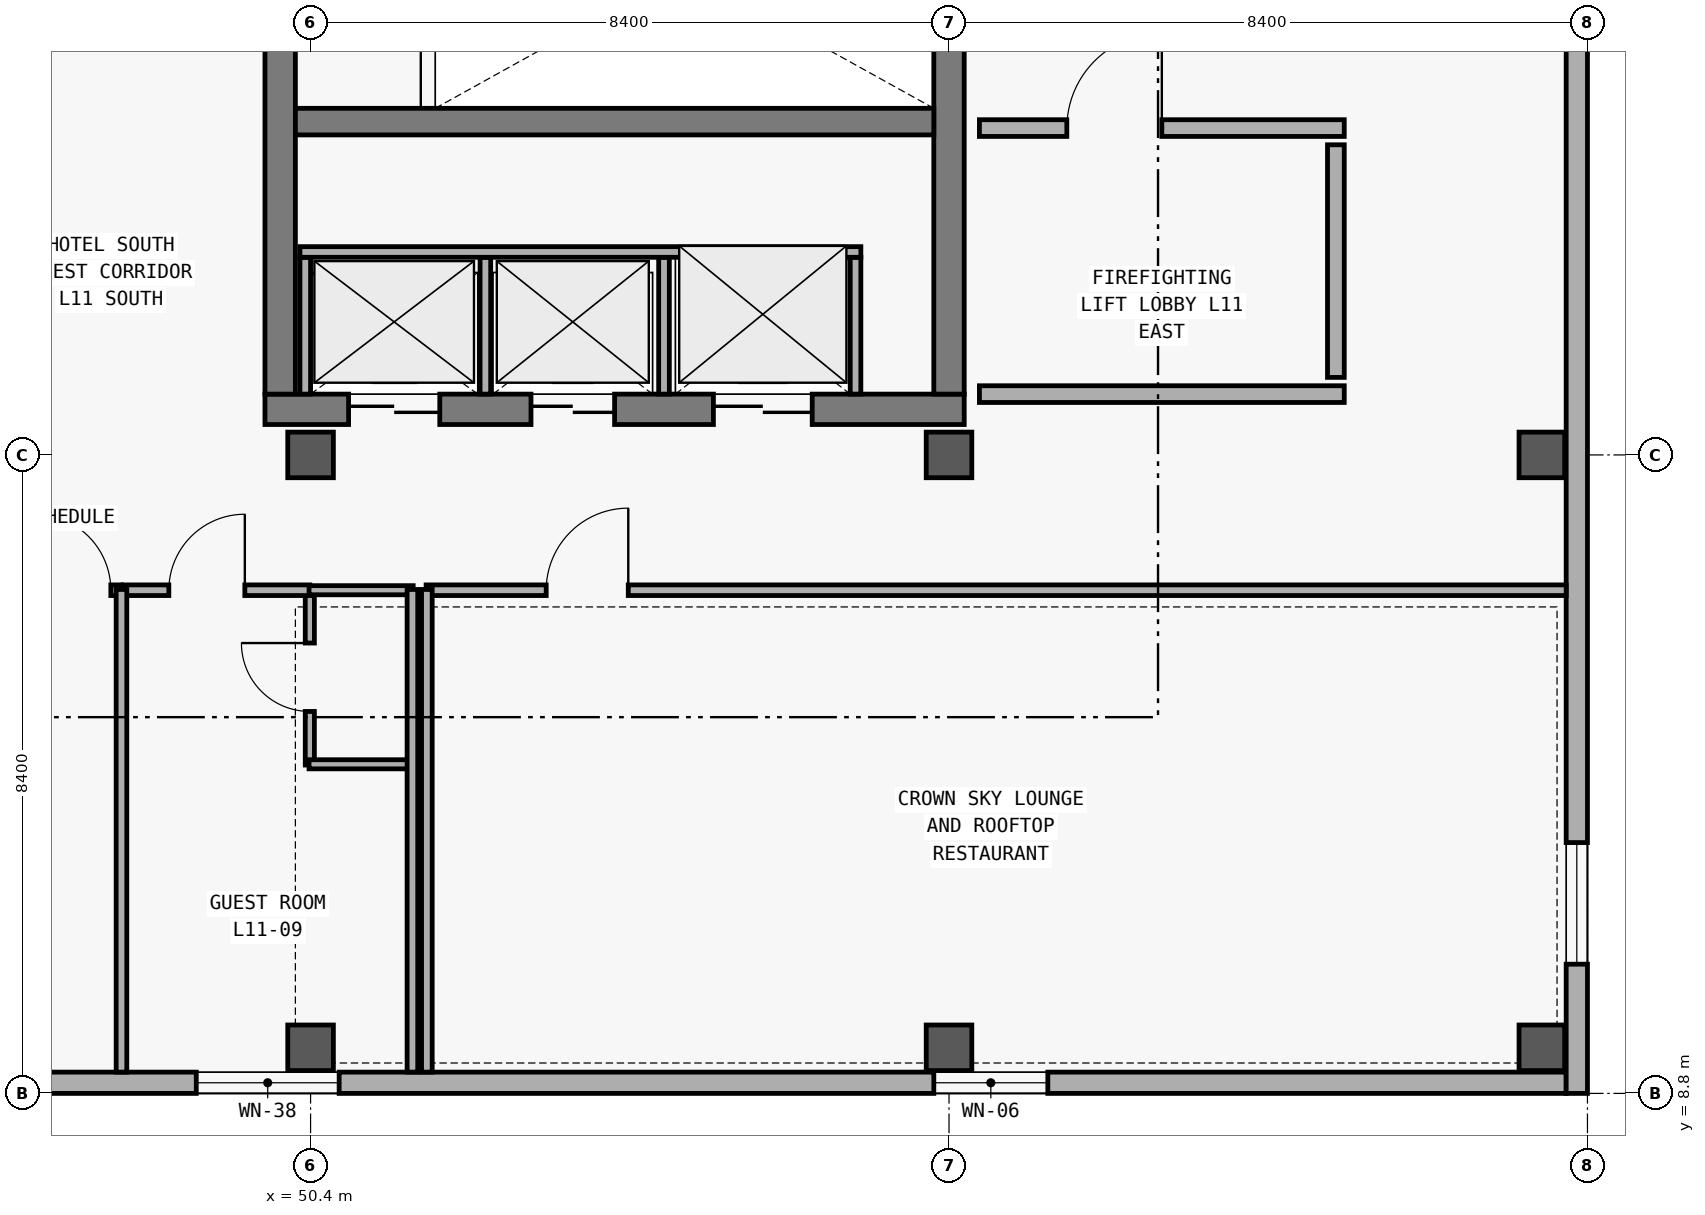
"""IFC4 building model, lengths in metres.
Left out: names, types, materials, properties, quantities, classifications, styles, units other than length and angle.
Written with IfcOpenShell. Run it as: python <this file> out.ifc"""

import sys

from ifc_helpers import new_model, si_unit, direction, frame, frame_2d, origin, origin_2d, place, context, subcontext, project, spatial, rectangle, extrude, element, fill, save


model = new_model("IFC4")
c1 = context("Model", 3, precision=1e-05, world=origin(), true_north=direction((0.0, 1.0)))
c2 = subcontext(c1, "Body", "Model", "MODEL_VIEW")
j1 = project(units=[si_unit("LENGTHUNIT", "METRE"), si_unit("PLANEANGLEUNIT", "RADIAN")], contexts=[c1])
p1 = place(None, origin())
s1 = spatial("IfcSite", under=j1, at=p1, CompositionType="ELEMENT")
p2 = place(p1, origin())
s2 = spatial("IfcBuilding", under=s1, at=p2, CompositionType="ELEMENT")
p3 = place(p2, frame((0.0, 0.0, 44.4)))
s3 = spatial("IfcBuildingStorey", under=s2, at=p3, CompositionType="ELEMENT", Elevation=44.4)
for number, where, z_axis, x_axis in (
    (1, (50.4, 9.4, 0.0), (0.0, 0.0, 1.0), (1.0, 0.0, 0.0)),
    (2, (50.4, 17.2, 0.0), (0.0, 0.0, 1.0), (1.0, 0.0, 0.0)),
    (3, (58.8, 9.4, 0.0), (0.0, 0.0, 1.0), (1.0, 0.0, 0.0)),
    (4, (58.8, 17.2, 0.0), (0.0, 0.0, 1.0), (1.0, 0.0, 0.0)),
    (5, (66.6, 9.4, 0.0), (0.0, 0.0, 1.0), (1.0, 0.0, 0.0)),
    (6, (66.6, 17.2, 0.0), (0.0, 0.0, 1.0), (1.0, 0.0, 0.0)),
):
    element("IfcColumn", number, at=place(p3, frame(where, z_axis=z_axis, x_axis=x_axis)), inside=s3, PredefinedType="COLUMN", context=c2, shape_type="SweptSolid", body=[
        extrude(rectangle(XDim=0.6, YDim=0.6, at=origin_2d()), origin(), (0.0, 0.0, 1.0), 4.2),
    ])
p4 = place(p3, frame((66.92, 8.94, 0.0), z_axis=(0.0, 0.0, 1.0), x_axis=(-1.0, 0.0, 0.0)))
e7 = element("IfcWall", 7, at=p4, inside=s3, PredefinedType="SOLIDWALL", context=c2, shape_type="SweptSolid", body=[
    extrude(rectangle(XDim=49.84, YDim=0.28, at=frame_2d((24.92, 0.0))), origin(), (0.0, 0.0, 1.0), 3.96),
])
p5 = place(p4, frame((6.82, 0.0, 0.85)))
e8 = element("IfcOpeningElement", 8, at=p5, cuts=e7, PredefinedType="OPENING", context=c2, shape_type="SweptSolid", body=[
    extrude(rectangle(XDim=1.5, YDim=1.75, at=frame_2d((0.75, 0.875))), frame((0.0, 0.15, 0.0), z_axis=(0.0, -1.0, 0.0), x_axis=(1.0, 0.0, 0.0)), (0.0, 0.0, 1.0), 0.3),
])
p6 = place(p4, frame((46.331, 0.0, 0.85)))
e9 = element("IfcOpeningElement", 9, at=p6, cuts=e7, PredefinedType="OPENING", context=c2, shape_type="SweptSolid", body=[
    extrude(rectangle(XDim=2.75, YDim=2.1, at=frame_2d((1.375, 1.05))), frame((0.0, 0.15, 0.0), z_axis=(0.0, -1.0, 0.0), x_axis=(1.0, 0.0, 0.0)), (0.0, 0.0, 1.0), 0.3),
])
p7 = place(p4, frame((43.288, 0.0, 0.85)))
e10 = element("IfcOpeningElement", 10, at=p7, cuts=e7, PredefinedType="OPENING", context=c2, shape_type="SweptSolid", body=[
    extrude(rectangle(XDim=1.18, YDim=1.5, at=frame_2d((0.59, 0.75))), frame((0.0, 0.15, 0.0), z_axis=(0.0, -1.0, 0.0), x_axis=(1.0, 0.0, 0.0)), (0.0, 0.0, 1.0), 0.3),
])
p8 = place(p4, frame((39.41, 0.0, 0.85)))
e11 = element("IfcOpeningElement", 11, at=p8, cuts=e7, PredefinedType="OPENING", context=c2, shape_type="SweptSolid", body=[
    extrude(rectangle(XDim=1.28, YDim=1.6, at=frame_2d((0.64, 0.8))), frame((0.0, 0.15, 0.0), z_axis=(0.0, -1.0, 0.0), x_axis=(1.0, 0.0, 0.0)), (0.0, 0.0, 1.0), 0.3),
])
p9 = place(p4, frame((35.533, 0.0, 0.85)))
e12 = element("IfcOpeningElement", 12, at=p9, cuts=e7, PredefinedType="OPENING", context=c2, shape_type="SweptSolid", body=[
    extrude(rectangle(XDim=1.38, YDim=1.7, at=frame_2d((0.69, 0.85))), frame((0.0, 0.15, 0.0), z_axis=(0.0, -1.0, 0.0), x_axis=(1.0, 0.0, 0.0)), (0.0, 0.0, 1.0), 0.3),
])
p10 = place(p4, frame((31.655, 0.0, 0.85)))
e13 = element("IfcOpeningElement", 13, at=p10, cuts=e7, PredefinedType="OPENING", context=c2, shape_type="SweptSolid", body=[
    extrude(rectangle(XDim=1.48, YDim=1.8, at=frame_2d((0.74, 0.9))), frame((0.0, 0.15, 0.0), z_axis=(0.0, -1.0, 0.0), x_axis=(1.0, 0.0, 0.0)), (0.0, 0.0, 1.0), 0.3),
])
p11 = place(p4, frame((27.777, 0.0, 0.85)))
e14 = element("IfcOpeningElement", 14, at=p11, cuts=e7, PredefinedType="OPENING", context=c2, shape_type="SweptSolid", body=[
    extrude(rectangle(XDim=1.58, YDim=1.85, at=frame_2d((0.79, 0.925))), frame((0.0, 0.15, 0.0), z_axis=(0.0, -1.0, 0.0), x_axis=(1.0, 0.0, 0.0)), (0.0, 0.0, 1.0), 0.3),
])
p12 = place(p4, frame((23.899, 0.0, 0.85)))
e15 = element("IfcOpeningElement", 15, at=p12, cuts=e7, PredefinedType="OPENING", context=c2, shape_type="SweptSolid", body=[
    extrude(rectangle(XDim=1.68, YDim=1.9, at=frame_2d((0.84, 0.95))), frame((0.0, 0.15, 0.0), z_axis=(0.0, -1.0, 0.0), x_axis=(1.0, 0.0, 0.0)), (0.0, 0.0, 1.0), 0.3),
])
p13 = place(p4, frame((20.022, 0.0, 0.85)))
e16 = element("IfcOpeningElement", 16, at=p13, cuts=e7, PredefinedType="OPENING", context=c2, shape_type="SweptSolid", body=[
    extrude(rectangle(XDim=1.78, YDim=1.95, at=frame_2d((0.89, 0.975))), frame((0.0, 0.15, 0.0), z_axis=(0.0, -1.0, 0.0), x_axis=(1.0, 0.0, 0.0)), (0.0, 0.0, 1.0), 0.3),
])
p14 = place(p4, frame((16.144, 0.0, 0.85)))
e17 = element("IfcOpeningElement", 17, at=p14, cuts=e7, PredefinedType="OPENING", context=c2, shape_type="SweptSolid", body=[
    extrude(rectangle(XDim=1.88, YDim=1.95, at=frame_2d((0.94, 0.975))), frame((0.0, 0.15, 0.0), z_axis=(0.0, -1.0, 0.0), x_axis=(1.0, 0.0, 0.0)), (0.0, 0.0, 1.0), 0.3),
])
p15 = place(p3, frame((67.06, 34.0, 0.0), z_axis=(0.0, 0.0, 1.0), x_axis=(0.0, -1.0, 0.0)))
e18 = element("IfcWall", 18, at=p15, inside=s3, PredefinedType="SOLIDWALL", context=c2, shape_type="SweptSolid", body=[
    extrude(rectangle(XDim=25.2, YDim=0.28, at=frame_2d((12.6, 0.0))), origin(), (0.0, 0.0, 1.0), 3.96),
])
p16 = place(p15, frame((21.9, 0.0, 0.95)))
e19 = element("IfcOpeningElement", 19, at=p16, cuts=e18, PredefinedType="OPENING", context=c2, shape_type="SweptSolid", body=[
    extrude(rectangle(XDim=1.6, YDim=1.6, at=frame_2d((0.8, 0.8))), frame((0.0, 0.15, 0.0), z_axis=(0.0, -1.0, 0.0), x_axis=(1.0, 0.0, 0.0)), (0.0, 0.0, 1.0), 0.3),
])
p17 = place(p3, frame((49.8, 17.8, 0.0), z_axis=(0.0, 0.0, 1.0), x_axis=(1.0, 0.0, 0.0)))
e20 = element("IfcWall", 20, at=p17, inside=s3, PredefinedType="SHEAR", context=c2, shape_type="SweptSolid", body=[
    extrude(rectangle(XDim=9.2, YDim=0.4, at=frame_2d((4.6, 0.0))), origin(), (0.0, 0.0, 1.0), 3.96),
])
p18 = place(p17, frame((1.1, 0.0, 0.0)))
e21 = element("IfcOpeningElement", 21, at=p18, cuts=e20, PredefinedType="OPENING", context=c2, shape_type="SweptSolid", body=[
    extrude(rectangle(XDim=1.2, YDim=2.2, at=frame_2d((0.6, 1.1))), frame((0.0, 0.21, 0.0), z_axis=(0.0, -1.0, 0.0), x_axis=(1.0, 0.0, 0.0)), (0.0, 0.0, 1.0), 0.42),
])
p19 = place(p17, frame((3.5, 0.0, 0.0)))
e22 = element("IfcOpeningElement", 22, at=p19, cuts=e20, PredefinedType="OPENING", context=c2, shape_type="SweptSolid", body=[
    extrude(rectangle(XDim=1.1, YDim=2.2, at=frame_2d((0.55, 1.1))), frame((0.0, 0.21, 0.0), z_axis=(0.0, -1.0, 0.0), x_axis=(1.0, 0.0, 0.0)), (0.0, 0.0, 1.0), 0.42),
])
p20 = place(p17, frame((5.9, 0.0, 0.0)))
e23 = element("IfcOpeningElement", 23, at=p20, cuts=e20, PredefinedType="OPENING", context=c2, shape_type="SweptSolid", body=[
    extrude(rectangle(XDim=1.3, YDim=2.3, at=frame_2d((0.65, 1.15))), frame((0.0, 0.21, 0.0), z_axis=(0.0, -1.0, 0.0), x_axis=(1.0, 0.0, 0.0)), (0.0, 0.0, 1.0), 0.42),
])
p21 = place(p3, frame((50.0, 25.4, 0.0), z_axis=(0.0, 0.0, 1.0), x_axis=(0.0, -1.0, 0.0)))
e24 = element("IfcWall", 24, at=p21, inside=s3, PredefinedType="SHEAR", context=c2, shape_type="SweptSolid", body=[
    extrude(rectangle(XDim=7.4, YDim=0.4, at=frame_2d((3.7, 0.0))), origin(), (0.0, 0.0, 1.0), 3.96),
])
p22 = place(p21, frame((0.35, 0.0, 0.0)))
e25 = element("IfcOpeningElement", 25, at=p22, cuts=e24, PredefinedType="OPENING", context=c2, shape_type="SweptSolid", body=[
    extrude(rectangle(XDim=1.15, YDim=2.2, at=frame_2d((0.575, 1.1))), frame((0.0, 0.21, 0.0), z_axis=(0.0, -1.0, 0.0), x_axis=(1.0, 0.0, 0.0)), (0.0, 0.0, 1.0), 0.42),
])
p23 = place(p3, frame((58.8, 18.0, 0.0), z_axis=(0.0, 0.0, 1.0), x_axis=(0.0, 1.0, 0.0)))
e26 = element("IfcWall", 26, at=p23, inside=s3, PredefinedType="SHEAR", context=c2, shape_type="SweptSolid", body=[
    extrude(rectangle(XDim=7.4, YDim=0.4, at=frame_2d((3.7, 0.0))), origin(), (0.0, 0.0, 1.0), 3.96),
])
p24 = place(p3, frame((50.2, 21.585, 0.0), z_axis=(0.0, 0.0, 1.0), x_axis=(1.0, 0.0, 0.0)))
e27 = element("IfcWall", 27, at=p24, inside=s3, PredefinedType="SHEAR", context=c2, shape_type="SweptSolid", body=[
    extrude(rectangle(XDim=8.4, YDim=0.35, at=frame_2d((4.2, 0.0))), origin(), (0.0, 0.0, 1.0), 3.96),
])
for number, where, z_axis, x_axis in (
    (28, (50.33, 18.0, 0.0), (0.0, 0.0, 1.0), (0.0, 1.0, 0.0)),
    (29, (52.7, 18.0, 0.0), (0.0, 0.0, 1.0), (0.0, 1.0, 0.0)),
    (30, (55.05, 18.0, 0.0), (0.0, 0.0, 1.0), (0.0, 1.0, 0.0)),
    (31, (57.57, 18.0, 0.0), (0.0, 0.0, 1.0), (0.0, 1.0, 0.0)),
):
    element("IfcWall", number, at=place(p3, frame(where, z_axis=z_axis, x_axis=x_axis)), inside=s3, PredefinedType="PARTITIONING", context=c2, shape_type="SweptSolid", body=[
        extrude(rectangle(XDim=1.8, YDim=0.14, at=frame_2d((0.9, 0.0))), origin(), (0.0, 0.0, 1.0), 3.11),
    ])
p25 = place(p3, frame((50.26, 19.87, 0.0), z_axis=(0.0, 0.0, 1.0), x_axis=(1.0, 0.0, 0.0)))
e32 = element("IfcWall", 32, at=p25, inside=s3, PredefinedType="PARTITIONING", context=c2, shape_type="SweptSolid", body=[
    extrude(rectangle(XDim=7.38, YDim=0.14, at=frame_2d((3.69, 0.0))), origin(), (0.0, 0.0, 1.0), 3.11),
])
p26 = place(p3, frame((59.2, 18.0, 0.0), z_axis=(0.0, 0.0, 1.0), x_axis=(1.0, 0.0, 0.0)))
e33 = element("IfcWall", 33, at=p26, inside=s3, PredefinedType="SOLIDWALL", context=c2, shape_type="SweptSolid", body=[
    extrude(rectangle(XDim=4.8, YDim=0.22, at=frame_2d((2.4, 0.0))), origin(), (0.0, 0.0, 1.0), 3.11),
])
p27 = place(p3, frame((59.2, 21.5, 0.0), z_axis=(0.0, 0.0, 1.0), x_axis=(1.0, 0.0, 0.0)))
e34 = element("IfcWall", 34, at=p27, inside=s3, PredefinedType="SOLIDWALL", context=c2, shape_type="SweptSolid", body=[
    extrude(rectangle(XDim=4.8, YDim=0.22, at=frame_2d((2.4, 0.0))), origin(), (0.0, 0.0, 1.0), 3.11),
])
p28 = place(p27, frame((1.15, 0.0, 0.0)))
e35 = element("IfcOpeningElement", 35, at=p28, cuts=e34, PredefinedType="OPENING", context=c2, shape_type="SweptSolid", body=[
    extrude(rectangle(XDim=1.25, YDim=2.2, at=frame_2d((0.625, 1.1))), frame((0.0, 0.12, 0.0), z_axis=(0.0, -1.0, 0.0), x_axis=(1.0, 0.0, 0.0)), (0.0, 0.0, 1.0), 0.24),
])
p29 = place(p3, frame((63.89, 18.22, 0.0), z_axis=(0.0, 0.0, 1.0), x_axis=(0.0, 1.0, 0.0)))
e36 = element("IfcWall", 36, at=p29, inside=s3, PredefinedType="SOLIDWALL", context=c2, shape_type="SweptSolid", body=[
    extrude(rectangle(XDim=3.06, YDim=0.22, at=frame_2d((1.53, 0.0))), origin(), (0.0, 0.0, 1.0), 3.11),
])
p30 = place(p3, frame((50.39, 13.12, 0.0), z_axis=(0.0, 0.0, 1.0), x_axis=(0.0, 1.0, 0.0)))
e37 = element("IfcWall", 37, at=p30, inside=s3, PredefinedType="PARTITIONING", context=c2, shape_type="SweptSolid", body=[
    extrude(rectangle(XDim=2.31, YDim=0.12, at=frame_2d((1.155, 0.0))), origin(), (0.0, 0.0, 1.0), 3.06),
])
p31 = place(p30, frame((0.705, 0.0, 0.0)))
e38 = element("IfcOpeningElement", 38, at=p31, cuts=e37, PredefinedType="OPENING", context=c2, shape_type="SweptSolid", body=[
    extrude(rectangle(XDim=0.9, YDim=2.18, at=frame_2d((0.45, 1.09))), frame((0.0, 0.07, 0.0), z_axis=(0.0, -1.0, 0.0), x_axis=(1.0, 0.0, 0.0)), (0.0, 0.0, 1.0), 0.14),
])
p32 = place(p3, frame((51.92, 15.42, 0.0), z_axis=(0.0, 0.0, 1.0), x_axis=(1.0, 0.0, 0.0)))
e39 = element("IfcWall", 39, at=p32, inside=s3, PredefinedType="PARTITIONING", context=c2, shape_type="SweptSolid", body=[
    extrude(rectangle(XDim=15.0, YDim=0.14, at=frame_2d((7.5, 0.0))), origin(), (0.0, 0.0, 1.0), 3.06),
])
p33 = place(p32, frame((1.58, 0.0, 0.0)))
e40 = element("IfcOpeningElement", 40, at=p33, cuts=e39, PredefinedType="OPENING", context=c2, shape_type="SweptSolid", body=[
    extrude(rectangle(XDim=1.08, YDim=2.25, at=frame_2d((0.54, 1.125))), frame((0.0, 0.08, 0.0), z_axis=(0.0, -1.0, 0.0), x_axis=(1.0, 0.0, 0.0)), (0.0, 0.0, 1.0), 0.16),
])
p34 = place(p3, frame((45.454, 15.42, 0.0), z_axis=(0.0, 0.0, 1.0), x_axis=(1.0, 0.0, 0.0)))
e41 = element("IfcWall", 41, at=p34, inside=s3, PredefinedType="PARTITIONING", context=c2, shape_type="SweptSolid", body=[
    extrude(rectangle(XDim=2.458, YDim=0.14, at=frame_2d((1.229, 0.0))), origin(), (0.0, 0.0, 1.0), 3.06),
])
p35 = place(p34, frame((1.318, 0.0, 0.0)))
e42 = element("IfcOpeningElement", 42, at=p35, cuts=e41, PredefinedType="OPENING", context=c2, shape_type="SweptSolid", body=[
    extrude(rectangle(XDim=1.0, YDim=2.28, at=frame_2d((0.5, 1.14))), frame((0.0, 0.08, 0.0), z_axis=(0.0, -1.0, 0.0), x_axis=(1.0, 0.0, 0.0)), (0.0, 0.0, 1.0), 0.16),
])
p36 = place(p3, frame((47.932, 15.42, 0.0), z_axis=(0.0, 0.0, 1.0), x_axis=(1.0, 0.0, 0.0)))
e43 = element("IfcWall", 43, at=p36, inside=s3, PredefinedType="PARTITIONING", context=c2, shape_type="SweptSolid", body=[
    extrude(rectangle(XDim=2.458, YDim=0.14, at=frame_2d((1.229, 0.0))), origin(), (0.0, 0.0, 1.0), 3.06),
])
p37 = place(p36, frame((0.603, 0.0, 0.0)))
e44 = element("IfcOpeningElement", 44, at=p37, cuts=e43, PredefinedType="OPENING", context=c2, shape_type="SweptSolid", body=[
    extrude(rectangle(XDim=1.0, YDim=2.28, at=frame_2d((0.5, 1.14))), frame((0.0, 0.08, 0.0), z_axis=(0.0, -1.0, 0.0), x_axis=(1.0, 0.0, 0.0)), (0.0, 0.0, 1.0), 0.16),
])
for number, where, z_axis, x_axis in (
    (45, (50.38, 13.13, 0.0), (0.0, 0.0, 1.0), (1.0, 0.0, 0.0)),
    (46, (50.38, 15.42, 0.0), (0.0, 0.0, 1.0), (1.0, 0.0, 0.0)),
):
    element("IfcWall", number, at=place(p3, frame(where, z_axis=z_axis, x_axis=x_axis)), inside=s3, PredefinedType="PARTITIONING", context=c2, shape_type="SweptSolid", body=[
        extrude(rectangle(XDim=1.37, YDim=0.12, at=frame_2d((0.685, 0.0))), origin(), (0.0, 0.0, 1.0), 3.06),
    ])
for number, where, z_axis, x_axis in (
    (47, (51.93, 9.08, 0.0), (0.0, 0.0, 1.0), (0.0, 1.0, 0.0)),
    (48, (47.912, 9.08, 0.0), (0.0, 0.0, 1.0), (0.0, 1.0, 0.0)),
    (49, (51.74, 9.08, 0.0), (0.0, 0.0, 1.0), (0.0, 1.0, 0.0)),
):
    element("IfcWall", number, at=place(p3, frame(where, z_axis=z_axis, x_axis=x_axis)), inside=s3, PredefinedType="PARTITIONING", context=c2, shape_type="SweptSolid", body=[
        extrude(rectangle(XDim=6.35, YDim=0.14, at=frame_2d((3.175, 0.0))), origin(), (0.0, 0.0, 1.0), 3.06),
    ])
p38 = place(p5, origin())
e50 = element("IfcWindow", 50, at=p38, inside=s3, PartitioningType="SINGLE_PANEL", PredefinedType="WINDOW", context=c2, shape_type="SweptSolid", body=[
    extrude(rectangle(XDim=1.5, YDim=1.75, at=frame_2d((0.75, 0.875))), frame((0.0, 0.03, 0.0), z_axis=(0.0, -1.0, 0.0), x_axis=(1.0, 0.0, 0.0)), (0.0, 0.0, 1.0), 0.06),
])
fill(e8, e50)
p39 = place(p14, origin())
e51 = element("IfcWindow", 51, at=p39, inside=s3, PartitioningType="SINGLE_PANEL", PredefinedType="WINDOW", context=c2, shape_type="SweptSolid", body=[
    extrude(rectangle(XDim=1.88, YDim=1.95, at=frame_2d((0.94, 0.975))), frame((0.0, 0.03, 0.0), z_axis=(0.0, -1.0, 0.0), x_axis=(1.0, 0.0, 0.0)), (0.0, 0.0, 1.0), 0.06),
])
fill(e17, e51)
p40 = place(p16, origin())
e52 = element("IfcWindow", 52, at=p40, inside=s3, PartitioningType="SINGLE_PANEL", PredefinedType="WINDOW", context=c2, shape_type="SweptSolid", body=[
    extrude(rectangle(XDim=1.6, YDim=1.6, at=frame_2d((0.8, 0.8))), frame((0.0, 0.03, 0.0), z_axis=(0.0, -1.0, 0.0), x_axis=(1.0, 0.0, 0.0)), (0.0, 0.0, 1.0), 0.06),
])
fill(e19, e52)
p41 = place(p18, origin())
e53 = element("IfcDoor", 53, at=p41, inside=s3, OperationType="DOUBLE_DOOR_SLIDING", PredefinedType="DOOR", context=c2, shape_type="SweptSolid", body=[
    extrude(rectangle(XDim=1.2, YDim=2.2, at=frame_2d((0.6, 1.1))), frame((0.0, 0.025, 0.0), z_axis=(0.0, -1.0, 0.0), x_axis=(1.0, 0.0, 0.0)), (0.0, 0.0, 1.0), 0.05),
])
fill(e21, e53)
p42 = place(p19, origin())
e54 = element("IfcDoor", 54, at=p42, inside=s3, OperationType="DOUBLE_DOOR_SLIDING", PredefinedType="DOOR", context=c2, shape_type="SweptSolid", body=[
    extrude(rectangle(XDim=1.1, YDim=2.2, at=frame_2d((0.55, 1.1))), frame((0.0, 0.025, 0.0), z_axis=(0.0, -1.0, 0.0), x_axis=(1.0, 0.0, 0.0)), (0.0, 0.0, 1.0), 0.05),
])
fill(e22, e54)
p43 = place(p20, origin())
e55 = element("IfcDoor", 55, at=p43, inside=s3, OperationType="DOUBLE_DOOR_SLIDING", PredefinedType="DOOR", context=c2, shape_type="SweptSolid", body=[
    extrude(rectangle(XDim=1.3, YDim=2.3, at=frame_2d((0.65, 1.15))), frame((0.0, 0.025, 0.0), z_axis=(0.0, -1.0, 0.0), x_axis=(1.0, 0.0, 0.0)), (0.0, 0.0, 1.0), 0.05),
])
fill(e23, e55)
p44 = place(p28, origin())
e56 = element("IfcDoor", 56, at=p44, inside=s3, OperationType="SINGLE_SWING_RIGHT", PredefinedType="DOOR", context=c2, shape_type="SweptSolid", body=[
    extrude(rectangle(XDim=1.25, YDim=2.2, at=frame_2d((0.625, 1.1))), frame((0.0, 0.025, 0.0), z_axis=(0.0, -1.0, 0.0), x_axis=(1.0, 0.0, 0.0)), (0.0, 0.0, 1.0), 0.05),
])
fill(e35, e56)
p45 = place(p31, origin())
e57 = element("IfcDoor", 57, at=p45, inside=s3, OperationType="SINGLE_SWING_RIGHT", PredefinedType="DOOR", context=c2, shape_type="SweptSolid", body=[
    extrude(rectangle(XDim=0.9, YDim=2.18, at=frame_2d((0.45, 1.09))), frame((0.0, 0.025, 0.0), z_axis=(0.0, -1.0, 0.0), x_axis=(1.0, 0.0, 0.0)), (0.0, 0.0, 1.0), 0.05),
])
fill(e38, e57)
p46 = place(p33, origin())
e58 = element("IfcDoor", 58, at=p46, inside=s3, OperationType="SINGLE_SWING_RIGHT", PredefinedType="DOOR", context=c2, shape_type="SweptSolid", body=[
    extrude(rectangle(XDim=1.08, YDim=2.25, at=frame_2d((0.54, 1.125))), frame((0.0, 0.025, 0.0), z_axis=(0.0, -1.0, 0.0), x_axis=(1.0, 0.0, 0.0)), (0.0, 0.0, 1.0), 0.05),
])
fill(e40, e58)
p47 = place(p35, origin())
e59 = element("IfcDoor", 59, at=p47, inside=s3, OperationType="SINGLE_SWING_LEFT", PredefinedType="DOOR", context=c2, shape_type="SweptSolid", body=[
    extrude(rectangle(XDim=1.0, YDim=2.28, at=frame_2d((0.5, 1.14))), frame((0.0, 0.025, 0.0), z_axis=(0.0, -1.0, 0.0), x_axis=(1.0, 0.0, 0.0)), (0.0, 0.0, 1.0), 0.05),
])
fill(e42, e59)
p48 = place(p37, origin())
e60 = element("IfcDoor", 60, at=p48, inside=s3, OperationType="SINGLE_SWING_RIGHT", PredefinedType="DOOR", context=c2, shape_type="SweptSolid", body=[
    extrude(rectangle(XDim=1.0, YDim=2.28, at=frame_2d((0.5, 1.14))), frame((0.0, 0.025, 0.0), z_axis=(0.0, -1.0, 0.0), x_axis=(1.0, 0.0, 0.0)), (0.0, 0.0, 1.0), 0.05),
])
fill(e44, e60)
save(model, sys.argv[1])
